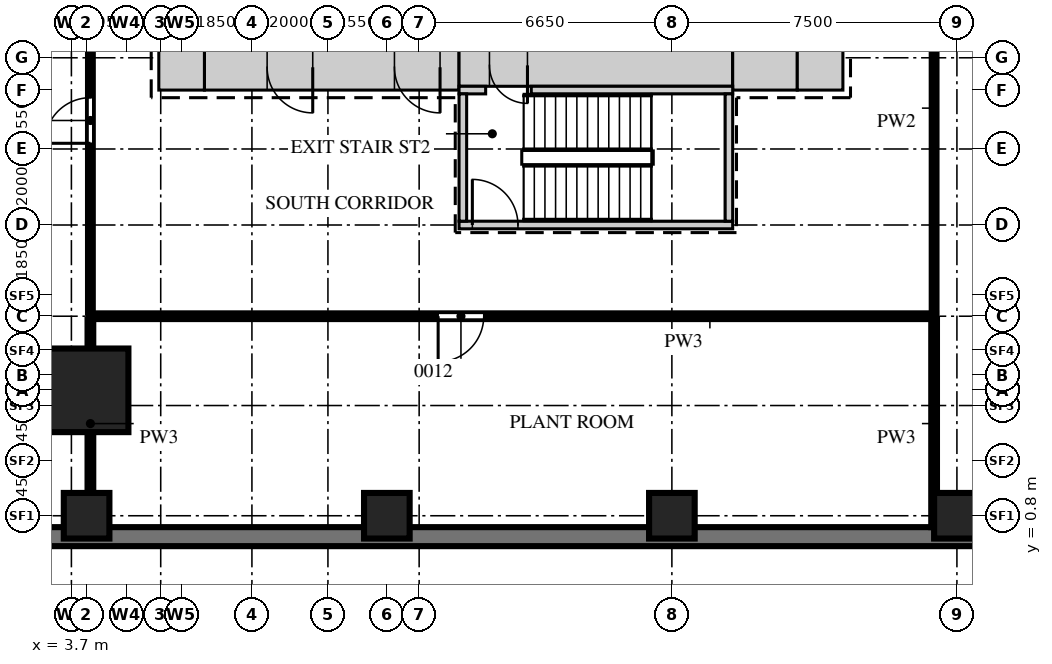
"""IFC4 building model, lengths in metres.
Left out: names, types, materials, properties, quantities, classifications, styles, units other than length and angle.
Written with IfcOpenShell. Run it as: python <this file> out.ifc"""

import sys

from ifc_helpers import new_model, si_unit, direction, frame, frame_2d, origin, origin_2d, place, context, subcontext, project, spatial, rectangle, extrude, source, transform, mapped, element, fill, save


model = new_model("IFC4")
c1 = context("Model", 3, precision=1e-05, world=origin(), true_north=direction((0.0, 1.0)))
c2 = subcontext(c1, "Body", "Model", "MODEL_VIEW")
j1 = project(units=[si_unit("LENGTHUNIT", "METRE"), si_unit("PLANEANGLEUNIT", "RADIAN")], contexts=[c1])
p1 = place(None, origin())
s1 = spatial("IfcSite", under=j1, at=p1, CompositionType="ELEMENT")
p2 = place(p1, origin())
s2 = spatial("IfcBuilding", under=s1, at=p2, CompositionType="ELEMENT")
p3 = place(p2, frame((0.0, 0.0, -4.5)))
s3 = spatial("IfcBuildingStorey", under=s2, at=p3, CompositionType="ELEMENT", Elevation=-4.5)
m1 = source(origin(), c2, "Body", "SweptSolid", [
    extrude(rectangle(XDim=6.7, YDim=1.2, at=frame_2d((3.35, 0.0))), origin(), (0.0, 0.0, 1.0), 4.15),
])
p4 = place(p3, frame((7.2, 12.6, 0.0), z_axis=(0.0, 0.0, 1.0), x_axis=(1.0, 0.0, 0.0)))
e1 = element("IfcWall", 1, at=p4, inside=s3, PredefinedType="SHEAR", context=c2, shape_type="MappedRepresentation", body=[
    mapped(m1, transform((0.0, 0.0, 0.0))),
])
m2 = source(origin(), c2, "Body", "SweptSolid", [
    extrude(rectangle(XDim=1.2, YDim=2.1, at=frame_2d((0.6, 1.05))), frame((0.0, 0.61, 0.0), z_axis=(0.0, -1.0, 0.0), x_axis=(1.0, 0.0, 0.0)), (0.0, 0.0, 1.0), 1.22),
])
p5 = place(p4, frame((5.0, 0.0, 0.0)))
e2 = element("IfcOpeningElement", 2, at=p5, cuts=e1, PredefinedType="OPENING", context=c2, shape_type="MappedRepresentation", body=[
    mapped(m2, transform((0.0, 0.0, 0.0))),
])
p6 = place(p4, frame((1.65, 0.0, 0.0)))
e3 = element("IfcOpeningElement", 3, at=p6, cuts=e1, PredefinedType="OPENING", context=c2, shape_type="MappedRepresentation", body=[
    mapped(m2, transform((0.0, 0.0, 0.0))),
])
m3 = source(origin(), c2, "Body", "SweptSolid", [
    extrude(rectangle(XDim=7.2, YDim=1.1, at=frame_2d((3.6, 0.0))), origin(), (0.0, 0.0, 1.0), 4.15),
])
p7 = place(p3, frame((13.9, 12.65, 0.0), z_axis=(0.0, 0.0, 1.0), x_axis=(1.0, 0.0, 0.0)))
e4 = element("IfcWall", 4, at=p7, inside=s3, PredefinedType="SHEAR", context=c2, shape_type="MappedRepresentation", body=[
    mapped(m3, transform((0.0, 0.0, 0.0))),
])
m4 = source(origin(), c2, "Body", "SweptSolid", [
    extrude(rectangle(XDim=1.0, YDim=2.1, at=frame_2d((0.5, 1.05))), frame((0.0, 0.56, 0.0), z_axis=(0.0, -1.0, 0.0), x_axis=(1.0, 0.0, 0.0)), (0.0, 0.0, 1.0), 1.12),
])
p8 = place(p7, frame((0.8, 0.0, 0.0)))
e5 = element("IfcOpeningElement", 5, at=p8, cuts=e4, PredefinedType="OPENING", context=c2, shape_type="MappedRepresentation", body=[
    mapped(m4, transform((0.0, 0.0, 0.0))),
])
m5 = source(origin(), c2, "Body", "SweptSolid", [
    extrude(rectangle(XDim=1.7, YDim=1.2, at=frame_2d((0.85, 0.0))), origin(), (0.0, 0.0, 1.0), 4.15),
])
p9 = place(p3, frame((21.1, 12.6, 0.0), z_axis=(0.0, 0.0, 1.0), x_axis=(1.0, 0.0, 0.0)))
e6 = element("IfcWall", 6, at=p9, inside=s3, PredefinedType="SHEAR", context=c2, shape_type="MappedRepresentation", body=[
    mapped(m5, transform((0.0, 0.0, 0.0))),
])
m6 = source(origin(), c2, "Body", "SweptSolid", [
    extrude(rectangle(XDim=1.2, YDim=1.2, at=frame_2d((0.6, 0.0))), origin(), (0.0, 0.0, 1.0), 4.15),
])
for number, where, z_axis, x_axis in (
    (7, (22.8, 12.6, 0.0), (0.0, 0.0, 1.0), (1.0, 0.0, 0.0)),
    (8, (6.0, 12.6, 0.0), (0.0, 0.0, 1.0), (1.0, 0.0, 0.0)),
):
    element("IfcWall", number, at=place(p3, frame(where, z_axis=z_axis, x_axis=x_axis)), inside=s3, PredefinedType="SHEAR", context=c2, shape_type="MappedRepresentation", body=[
        mapped(m6, transform((0.0, 0.0, 0.0))),
    ])
m7 = source(origin(), c2, "Body", "SweptSolid", [
    extrude(rectangle(XDim=0.7, YDim=0.2, at=frame_2d((0.35, 0.0))), origin(), (0.0, 0.0, 1.0), 4.15),
])
p10 = place(p3, frame((13.9, 12.0, 0.0), z_axis=(0.0, 0.0, 1.0), x_axis=(1.0, 0.0, 0.0)))
e9 = element("IfcWall", 9, at=p10, inside=s3, PredefinedType="SHEAR", context=c2, shape_type="MappedRepresentation", body=[
    mapped(m7, transform((0.0, 0.0, 0.0))),
])
m8 = source(origin(), c2, "Body", "SweptSolid", [
    extrude(rectangle(XDim=5.3, YDim=0.2, at=frame_2d((2.65, 0.0))), origin(), (0.0, 0.0, 1.0), 4.15),
])
p11 = place(p3, frame((15.8, 12.0, 0.0), z_axis=(0.0, 0.0, 1.0), x_axis=(1.0, 0.0, 0.0)))
e10 = element("IfcWall", 10, at=p11, inside=s3, PredefinedType="SHEAR", context=c2, shape_type="MappedRepresentation", body=[
    mapped(m8, transform((0.0, 0.0, 0.0))),
])
m9 = source(origin(), c2, "Body", "SweptSolid", [
    extrude(rectangle(XDim=7.2, YDim=0.2, at=frame_2d((3.6, 0.0))), origin(), (0.0, 0.0, 1.0), 4.15),
])
p12 = place(p3, frame((13.9, 8.45, 0.0), z_axis=(0.0, 0.0, 1.0), x_axis=(1.0, 0.0, 0.0)))
e11 = element("IfcWall", 11, at=p12, inside=s3, PredefinedType="SHEAR", context=c2, shape_type="MappedRepresentation", body=[
    mapped(m9, transform((0.0, 0.0, 0.0))),
])
m10 = source(origin(), c2, "Body", "SweptSolid", [
    extrude(rectangle(XDim=1.2, YDim=2.1, at=frame_2d((0.6, 1.05))), frame((0.0, 0.11, 0.0), z_axis=(0.0, -1.0, 0.0), x_axis=(1.0, 0.0, 0.0)), (0.0, 0.0, 1.0), 0.22),
])
p13 = place(p12, frame((0.35, 0.0, 0.0)))
e12 = element("IfcOpeningElement", 12, at=p13, cuts=e11, PredefinedType="OPENING", context=c2, shape_type="MappedRepresentation", body=[
    mapped(m10, transform((0.0, 0.0, 0.0))),
])
m11 = source(origin(), c2, "Body", "SweptSolid", [
    extrude(rectangle(XDim=3.35, YDim=0.2, at=frame_2d((1.675, 0.0))), origin(), (0.0, 0.0, 1.0), 4.15),
])
for number, where, z_axis, x_axis in (
    (13, (21.0, 8.55, 0.0), (0.0, 0.0, 1.0), (0.0, 1.0, 0.0)),
    (14, (14.0, 8.55, 0.0), (0.0, 0.0, 1.0), (0.0, 1.0, 0.0)),
):
    element("IfcWall", number, at=place(p3, frame(where, z_axis=z_axis, x_axis=x_axis)), inside=s3, PredefinedType="SHEAR", context=c2, shape_type="MappedRepresentation", body=[
        mapped(m11, transform((0.0, 0.0, 0.0))),
    ])
m12 = source(origin(), c2, "Body", "SweptSolid", [
    extrude(rectangle(XDim=90.0, YDim=0.5, at=frame_2d((45.0, 0.0))), origin(), (0.0, 0.0, 1.0), 4.15),
])
p14 = place(p3, frame((-9.0, 0.25, 0.0), z_axis=(0.0, 0.0, 1.0), x_axis=(1.0, 0.0, 0.0)))
e15 = element("IfcWall", 15, at=p14, inside=s3, PredefinedType="STANDARD", context=c2, shape_type="MappedRepresentation", body=[
    mapped(m12, transform((0.0, 0.0, 0.0))),
])
m13 = source(origin(), c2, "Body", "SweptSolid", [
    extrude(rectangle(XDim=2.2, YDim=2.2, at=origin_2d()), origin(), (0.0, 0.0, 1.0), 4.5),
])
p15 = place(p3, frame((4.1, 4.1, 0.0), z_axis=(0.0, 0.0, 1.0), x_axis=(1.0, 0.0, 0.0)))
e16 = element("IfcColumn", 16, at=p15, inside=s3, PredefinedType="COLUMN", context=c2, shape_type="MappedRepresentation", body=[
    mapped(m13, transform((0.0, 0.0, 0.0))),
])
m14 = source(origin(), c2, "Body", "SweptSolid", [
    extrude(rectangle(XDim=1.2, YDim=1.2, at=origin_2d()), origin(), (0.0, 0.0, 1.0), 4.15),
])
for number, where, z_axis, x_axis in (
    (17, (4.1, 0.8, 0.0), (0.0, 0.0, 1.0), (1.0, 0.0, 0.0)),
    (18, (12.0, 0.8, 0.0), (0.0, 0.0, 1.0), (1.0, 0.0, 0.0)),
    (19, (19.5, 0.8, 0.0), (0.0, 0.0, 1.0), (1.0, 0.0, 0.0)),
    (20, (27.0, 0.8, 0.0), (0.0, 0.0, 1.0), (1.0, 0.0, 0.0)),
):
    element("IfcColumn", number, at=place(p3, frame(where, z_axis=z_axis, x_axis=x_axis)), inside=s3, PredefinedType="COLUMN", context=c2, shape_type="MappedRepresentation", body=[
        mapped(m14, transform((0.0, 0.0, 0.0))),
    ])
m15 = source(origin(), c2, "Body", "SweptSolid", [
    extrude(rectangle(XDim=5.45, YDim=0.15, at=frame_2d((2.725, 0.0))), origin(), (0.0, 0.0, 1.0), 4.15),
])
for number, where, z_axis, x_axis in (
    (21, (4.2, 0.5, 0.0), (0.0, 0.0, 1.0), (0.0, 1.0, 0.0)),
    (22, (26.4, 0.5, 0.0), (0.0, 0.0, 1.0), (0.0, 1.0, 0.0)),
):
    element("IfcWall", number, at=place(p3, frame(where, z_axis=z_axis, x_axis=x_axis)), inside=s3, PredefinedType="PARTITIONING", context=c2, shape_type="MappedRepresentation", body=[
        mapped(m15, transform((0.0, 0.0, 0.0))),
    ])
m16 = source(origin(), c2, "Body", "SweptSolid", [
    extrude(rectangle(XDim=22.3, YDim=0.15, at=frame_2d((11.15, 0.0))), origin(), (0.0, 0.0, 1.0), 4.15),
])
p16 = place(p3, frame((4.15, 6.05, 0.0), z_axis=(0.0, 0.0, 1.0), x_axis=(1.0, 0.0, 0.0)))
e23 = element("IfcWall", 23, at=p16, inside=s3, PredefinedType="PARTITIONING", context=c2, shape_type="MappedRepresentation", body=[
    mapped(m16, transform((0.0, 0.0, 0.0))),
])
m17 = source(origin(), c2, "Body", "SweptSolid", [
    extrude(rectangle(XDim=1.2, YDim=2.1, at=frame_2d((0.6, 1.05))), frame((0.0, 0.085, 0.0), z_axis=(0.0, -1.0, 0.0), x_axis=(1.0, 0.0, 0.0)), (0.0, 0.0, 1.0), 0.17),
])
p17 = place(p16, frame((9.2, 0.0, 0.0)))
e24 = element("IfcOpeningElement", 24, at=p17, cuts=e23, PredefinedType="OPENING", context=c2, shape_type="MappedRepresentation", body=[
    mapped(m17, transform((0.0, 0.0, 0.0))),
])
m18 = source(origin(), c2, "Body", "SweptSolid", [
    extrude(rectangle(XDim=41.8, YDim=0.125, at=frame_2d((20.9, 0.0))), origin(), (0.0, 0.0, 1.0), 4.15),
])
p18 = place(p3, frame((4.2, 6.15, 0.0), z_axis=(0.0, 0.0, 1.0), x_axis=(0.0, 1.0, 0.0)))
e25 = element("IfcWall", 25, at=p18, inside=s3, PredefinedType="PARTITIONING", context=c2, shape_type="MappedRepresentation", body=[
    mapped(m18, transform((0.0, 0.0, 0.0))),
])
m19 = source(origin(), c2, "Body", "SweptSolid", [
    extrude(rectangle(XDim=1.2, YDim=2.1, at=frame_2d((0.6, 1.05))), frame((0.0, 0.073, 0.0), z_axis=(0.0, -1.0, 0.0), x_axis=(1.0, 0.0, 0.0)), (0.0, 0.0, 1.0), 0.145),
])
p19 = place(p18, frame((4.45, 0.0, 0.0)))
e26 = element("IfcOpeningElement", 26, at=p19, cuts=e25, PredefinedType="OPENING", context=c2, shape_type="MappedRepresentation", body=[
    mapped(m19, transform((0.0, 0.0, 0.0))),
])
p20 = place(p18, frame((21.25, 0.0, 0.0)))
e27 = element("IfcOpeningElement", 27, at=p20, cuts=e25, PredefinedType="OPENING", context=c2, shape_type="MappedRepresentation", body=[
    mapped(m19, transform((0.0, 0.0, 0.0))),
])
p21 = place(p18, frame((37.05, 0.0, 0.0)))
e28 = element("IfcOpeningElement", 28, at=p21, cuts=e25, PredefinedType="OPENING", context=c2, shape_type="MappedRepresentation", body=[
    mapped(m19, transform((0.0, 0.0, 0.0))),
])
m20 = source(origin(), c2, "Body", "SweptSolid", [
    extrude(rectangle(XDim=10.75, YDim=0.125, at=frame_2d((5.375, 0.0))), origin(), (0.0, 0.0, 1.0), 4.15),
])
p22 = place(p3, frame((26.4, 6.15, 0.0), z_axis=(0.0, 0.0, 1.0), x_axis=(0.0, 1.0, 0.0)))
e29 = element("IfcWall", 29, at=p22, inside=s3, PredefinedType="PARTITIONING", context=c2, shape_type="MappedRepresentation", body=[
    mapped(m20, transform((0.0, 0.0, 0.0))),
])
m21 = source(origin(), c2, "Body", "SweptSolid", [
    extrude(rectangle(XDim=1.2, YDim=2.1, at=frame_2d((0.6, 1.05))), frame((0.0, 0.55, 0.0), z_axis=(0.0, -1.0, 0.0), x_axis=(1.0, 0.0, 0.0)), (0.0, 0.0, 1.0), 1.1),
])
p23 = place(p5, origin())
e30 = element("IfcDoor", 30, at=p23, inside=s3, OperationType="SINGLE_SWING_RIGHT", PredefinedType="DOOR", context=c2, shape_type="MappedRepresentation", body=[
    mapped(m21, transform((0.0, 0.0, 0.0))),
])
fill(e2, e30)
p24 = place(p6, origin())
e31 = element("IfcDoor", 31, at=p24, inside=s3, OperationType="SINGLE_SWING_RIGHT", PredefinedType="DOOR", context=c2, shape_type="MappedRepresentation", body=[
    mapped(m21, transform((0.0, 0.0, 0.0))),
])
fill(e3, e31)
m22 = source(origin(), c2, "Body", "SweptSolid", [
    extrude(rectangle(XDim=1.0, YDim=2.1, at=frame_2d((0.5, 1.05))), frame((0.0, 0.5, 0.0), z_axis=(0.0, -1.0, 0.0), x_axis=(1.0, 0.0, 0.0)), (0.0, 0.0, 1.0), 1.0),
])
p25 = place(p8, origin())
e32 = element("IfcDoor", 32, at=p25, inside=s3, OperationType="SINGLE_SWING_RIGHT", PredefinedType="DOOR", context=c2, shape_type="MappedRepresentation", body=[
    mapped(m22, transform((0.0, 0.0, 0.0))),
])
fill(e5, e32)
m23 = source(origin(), c2, "Body", "SweptSolid", [
    extrude(rectangle(XDim=1.2, YDim=2.1, at=frame_2d((0.6, 1.05))), frame((0.0, 0.025, 0.0), z_axis=(0.0, -1.0, 0.0), x_axis=(1.0, 0.0, 0.0)), (0.0, 0.0, 1.0), 0.05),
])
p26 = place(p19, origin())
e33 = element("IfcDoor", 33, at=p26, inside=s3, OperationType="SINGLE_SWING_RIGHT", PredefinedType="DOOR", context=c2, shape_type="MappedRepresentation", body=[
    mapped(m23, transform((0.0, 0.0, 0.0))),
])
fill(e26, e33)
p27 = place(p17, origin())
e34 = element("IfcDoor", 34, at=p27, inside=s3, OperationType="SINGLE_SWING_LEFT", PredefinedType="DOOR", context=c2, shape_type="MappedRepresentation", body=[
    mapped(m23, transform((0.0, 0.0, 0.0))),
])
fill(e24, e34)
p28 = place(p13, origin())
e35 = element("IfcDoor", 35, at=p28, inside=s3, OperationType="SINGLE_SWING_RIGHT", PredefinedType="DOOR", context=c2, shape_type="MappedRepresentation", body=[
    mapped(m23, transform((0.0, 0.0, 0.0))),
])
fill(e12, e35)
save(model, sys.argv[1])
